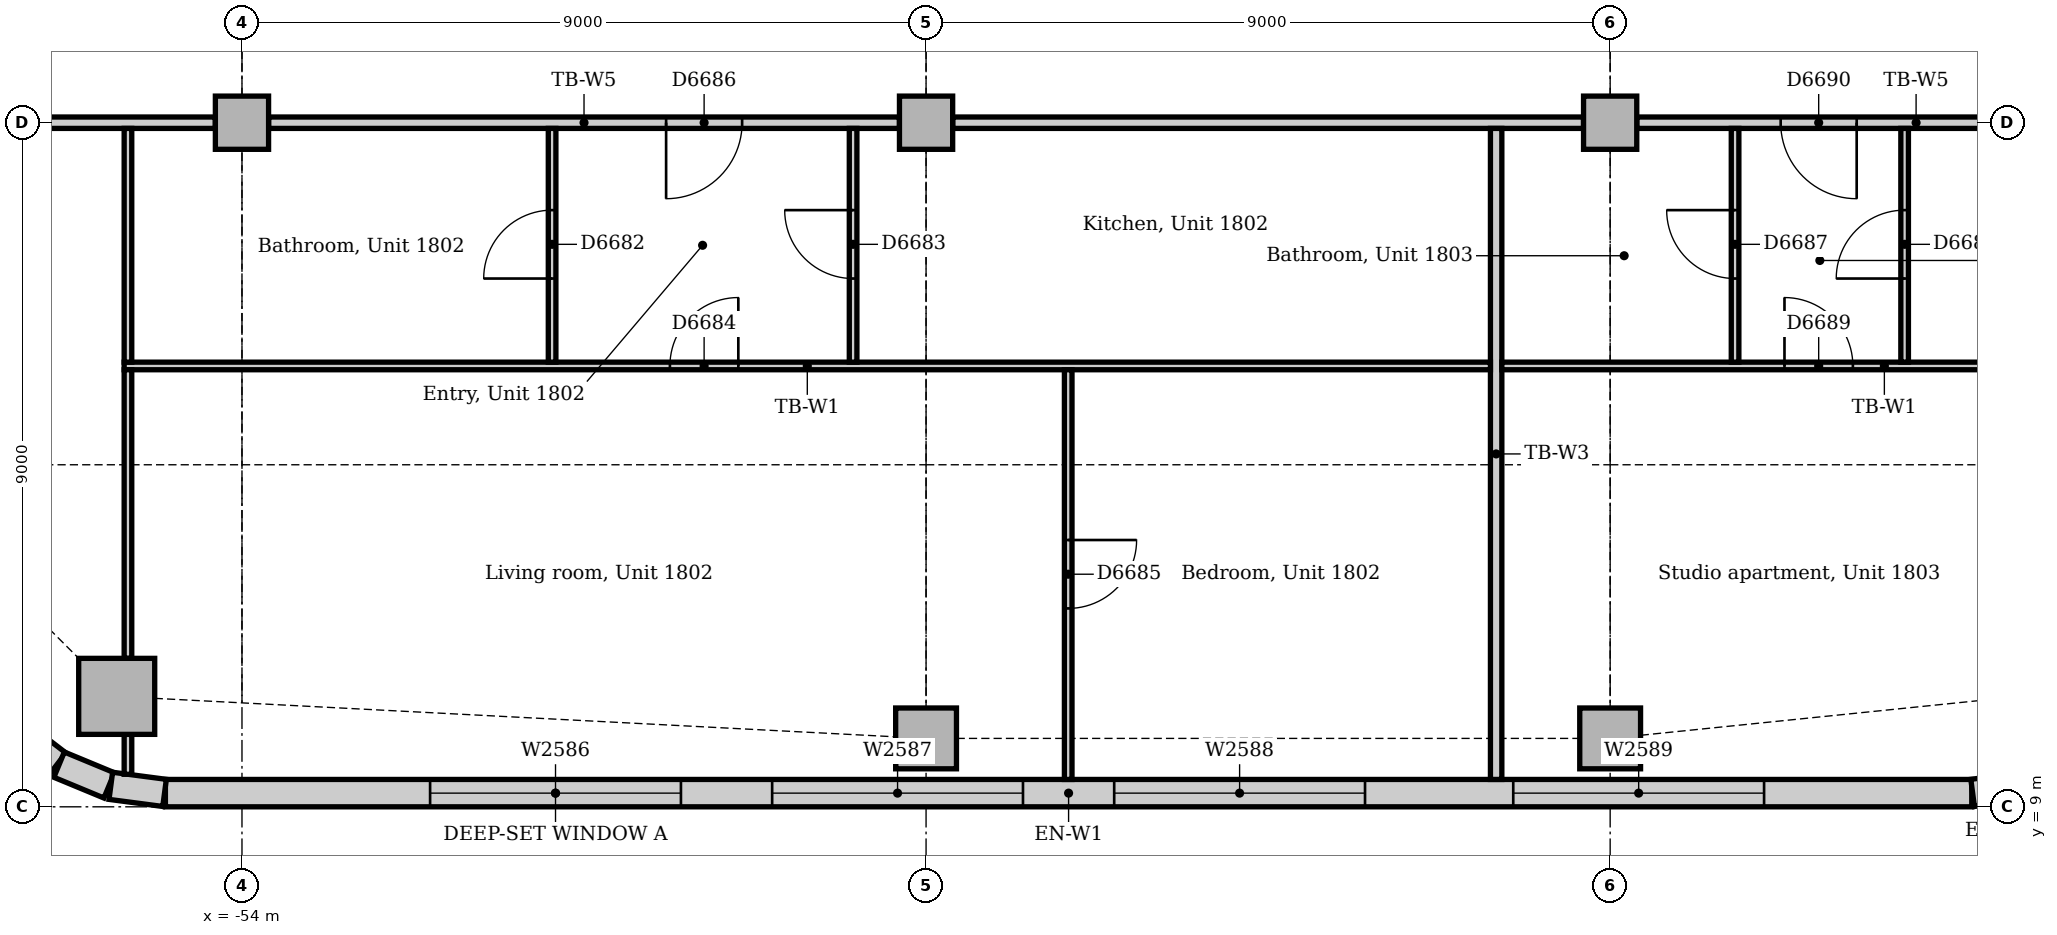
"""IFC4 building model, lengths in metres.
Left out: names, types, materials, properties, quantities, classifications, styles, units other than length and angle.
Written with IfcOpenShell. Run it as: python <this file> out.ifc"""

import sys

from ifc_helpers import new_model, si_unit, direction, frame, frame_2d, origin, origin_2d, place, context, subcontext, project, spatial, rectangle, extrude, element, fill, save


model = new_model("IFC4")
c1 = context("Model", 3, precision=1e-05, world=origin(), true_north=direction((0.0, 1.0)))
c2 = subcontext(c1, "Body", "Model", "MODEL_VIEW")
j1 = project(units=[si_unit("LENGTHUNIT", "METRE"), si_unit("PLANEANGLEUNIT", "RADIAN")], contexts=[c1])
p1 = place(None, origin())
s1 = spatial("IfcSite", under=j1, at=p1, CompositionType="ELEMENT")
p2 = place(p1, origin())
s2 = spatial("IfcBuilding", under=s1, at=p2, CompositionType="ELEMENT")
p3 = place(p2, frame((0.0, 0.0, 79.0)))
s3 = spatial("IfcBuildingStorey", under=s2, at=p3, CompositionType="ELEMENT", Elevation=79.0)
p4 = place(p3, frame((-55.648, 10.453, 0.0), z_axis=(0.0, 0.0, 1.0), x_axis=(1.0, 0.0, 0.0)))
e1 = element("IfcColumn", 1, at=p4, inside=s3, PredefinedType="COLUMN", context=c2, shape_type="SweptSolid", body=[
    extrude(rectangle(XDim=1.0, YDim=1.0, at=origin_2d()), origin(), (0.0, 0.0, 1.0), 3.85),
])
for number, where, z_axis, x_axis in (
    (2, (-45.0, 9.9, 0.0), (0.0, 0.0, 1.0), (1.0, 0.0, 0.0)),
    (3, (-36.0, 9.9, 0.0), (0.0, 0.0, 1.0), (1.0, 0.0, 0.0)),
):
    element("IfcColumn", number, at=place(p3, frame(where, z_axis=z_axis, x_axis=x_axis)), inside=s3, PredefinedType="COLUMN", context=c2, shape_type="SweptSolid", body=[
        extrude(rectangle(XDim=0.8, YDim=0.8, at=origin_2d()), origin(), (0.0, 0.0, 1.0), 3.85),
    ])
for number, where, z_axis, x_axis in (
    (4, (-54.0, 18.0, 0.0), (0.0, 0.0, 1.0), (1.0, 0.0, 0.0)),
    (5, (-45.0, 18.0, 0.0), (0.0, 0.0, 1.0), (1.0, 0.0, 0.0)),
    (6, (-36.0, 18.0, 0.0), (0.0, 0.0, 1.0), (1.0, 0.0, 0.0)),
):
    element("IfcColumn", number, at=place(p3, frame(where, z_axis=z_axis, x_axis=x_axis)), inside=s3, PredefinedType="COLUMN", context=c2, shape_type="SweptSolid", body=[
        extrude(rectangle(XDim=0.7, YDim=0.7, at=origin_2d()), origin(), (0.0, 0.0, 1.0), 3.85),
    ])
p5 = place(p3, frame((-55.007, 9.18, 0.0), z_axis=(0.0, 0.0, 1.0), x_axis=(1.0, 0.0, 0.0)))
e7 = element("IfcWall", 7, at=p5, inside=s3, PredefinedType="STANDARD", context=c2, shape_type="SweptSolid", body=[
    extrude(rectangle(XDim=23.765, YDim=0.36, at=frame_2d((11.882, 0.0))), origin(), (0.0, 0.0, 1.0), 3.85),
])
p6 = place(p5, frame((3.482, 0.0, 0.9)))
e8 = element("IfcOpeningElement", 8, at=p6, cuts=e7, PredefinedType="OPENING", context=c2, shape_type="SweptSolid", body=[
    extrude(rectangle(XDim=3.3, YDim=1.6, at=frame_2d((1.65, 0.8))), frame((0.0, 0.19, 0.0), z_axis=(0.0, -1.0, 0.0), x_axis=(1.0, 0.0, 0.0)), (0.0, 0.0, 1.0), 0.38),
])
p7 = place(p5, frame((7.982, 0.0, 0.9)))
e9 = element("IfcOpeningElement", 9, at=p7, cuts=e7, PredefinedType="OPENING", context=c2, shape_type="SweptSolid", body=[
    extrude(rectangle(XDim=3.3, YDim=1.6, at=frame_2d((1.65, 0.8))), frame((0.0, 0.19, 0.0), z_axis=(0.0, -1.0, 0.0), x_axis=(1.0, 0.0, 0.0)), (0.0, 0.0, 1.0), 0.38),
])
p8 = place(p5, frame((12.482, 0.0, 0.9)))
e10 = element("IfcOpeningElement", 10, at=p8, cuts=e7, PredefinedType="OPENING", context=c2, shape_type="SweptSolid", body=[
    extrude(rectangle(XDim=3.3, YDim=1.6, at=frame_2d((1.65, 0.8))), frame((0.0, 0.19, 0.0), z_axis=(0.0, -1.0, 0.0), x_axis=(1.0, 0.0, 0.0)), (0.0, 0.0, 1.0), 0.38),
])
p9 = place(p5, frame((17.732, 0.0, 0.9)))
e11 = element("IfcOpeningElement", 11, at=p9, cuts=e7, PredefinedType="OPENING", context=c2, shape_type="SweptSolid", body=[
    extrude(rectangle(XDim=3.3, YDim=1.6, at=frame_2d((1.65, 0.8))), frame((0.0, 0.19, 0.0), z_axis=(0.0, -1.0, 0.0), x_axis=(1.0, 0.0, 0.0)), (0.0, 0.0, 1.0), 0.38),
])
p10 = place(p3, frame((-31.231, 9.183, 0.0), z_axis=(0.0, 0.0, 1.0), x_axis=(0.99144092581, 0.13055608231, 0.0)))
e12 = element("IfcWall", 12, at=p10, inside=s3, PredefinedType="STANDARD", context=c2, shape_type="SweptSolid", body=[
    extrude(rectangle(XDim=0.713, YDim=0.36, at=frame_2d((0.356, 0.0))), origin(), (0.0, 0.0, 1.0), 3.85),
])
p11 = place(p3, frame((-56.991, 10.0, 0.0), z_axis=(0.0, 0.0, 1.0), x_axis=(0.793321924995, -0.608802368033, 0.0)))
e13 = element("IfcWall", 13, at=p11, inside=s3, PredefinedType="STANDARD", context=c2, shape_type="SweptSolid", body=[
    extrude(rectangle(XDim=0.713, YDim=0.36, at=frame_2d((0.357, 0.0))), origin(), (0.0, 0.0, 1.0), 3.85),
])
for number, where, z_axis, x_axis in (
    (14, (-56.406, 9.555, 0.0), (0.0, 0.0, 1.0), (0.924, -0.383, 0.0)),
    (15, (-55.726, 9.276, 0.0), (0.0, 0.0, 1.0), (0.991, -0.131, 0.0)),
):
    element("IfcWall", number, at=place(p3, frame(where, z_axis=z_axis, x_axis=x_axis)), inside=s3, PredefinedType="STANDARD", context=c2, shape_type="SweptSolid", body=[
        extrude(rectangle(XDim=0.713, YDim=0.36, at=frame_2d((0.356, 0.0))), origin(), (0.0, 0.0, 1.0), 3.85),
    ])
p12 = place(p3, frame((-35.65, 18.0, 0.0), z_axis=(0.0, 0.0, 1.0), x_axis=(1.0, 0.0, 0.0)))
e16 = element("IfcWall", 16, at=p12, inside=s3, PredefinedType="PARTITIONING", context=c2, shape_type="SweptSolid", body=[
    extrude(rectangle(XDim=7.35, YDim=0.15, at=frame_2d((3.675, 0.0))), origin(), (0.0, 0.0, 1.0), 3.158),
])
p13 = place(p12, frame((1.893, 0.0, 0.0)))
e17 = element("IfcOpeningElement", 17, at=p13, cuts=e16, PredefinedType="OPENING", context=c2, shape_type="SweptSolid", body=[
    extrude(rectangle(XDim=1.0, YDim=2.1, at=frame_2d((0.5, 1.05))), frame((0.0, 0.085, 0.0), z_axis=(0.0, -1.0, 0.0), x_axis=(1.0, 0.0, 0.0)), (0.0, 0.0, 1.0), 0.17),
])
p14 = place(p3, frame((-44.65, 18.0, 0.0), z_axis=(0.0, 0.0, 1.0), x_axis=(1.0, 0.0, 0.0)))
e18 = element("IfcWall", 18, at=p14, inside=s3, PredefinedType="PARTITIONING", context=c2, shape_type="SweptSolid", body=[
    extrude(rectangle(XDim=8.3, YDim=0.15, at=frame_2d((4.15, 0.0))), origin(), (0.0, 0.0, 1.0), 3.158),
])
p15 = place(p3, frame((-53.65, 18.0, 0.0), z_axis=(0.0, 0.0, 1.0), x_axis=(1.0, 0.0, 0.0)))
e19 = element("IfcWall", 19, at=p15, inside=s3, PredefinedType="PARTITIONING", context=c2, shape_type="SweptSolid", body=[
    extrude(rectangle(XDim=8.3, YDim=0.15, at=frame_2d((4.15, 0.0))), origin(), (0.0, 0.0, 1.0), 3.158),
])
p16 = place(p15, frame((5.23, 0.0, 0.0)))
e20 = element("IfcOpeningElement", 20, at=p16, cuts=e19, PredefinedType="OPENING", context=c2, shape_type="SweptSolid", body=[
    extrude(rectangle(XDim=1.0, YDim=2.1, at=frame_2d((0.5, 1.05))), frame((0.0, 0.085, 0.0), z_axis=(0.0, -1.0, 0.0), x_axis=(1.0, 0.0, 0.0)), (0.0, 0.0, 1.0), 0.17),
])
p17 = place(p3, frame((-64.596, 18.0, 0.0), z_axis=(0.0, 0.0, 1.0), x_axis=(1.0, 0.0, 0.0)))
e21 = element("IfcWall", 21, at=p17, inside=s3, PredefinedType="PARTITIONING", context=c2, shape_type="SweptSolid", body=[
    extrude(rectangle(XDim=10.246, YDim=0.15, at=frame_2d((5.123, 0.0))), origin(), (0.0, 0.0, 1.0), 3.158),
])
p18 = place(p17, frame((4.15, 0.0, 0.0)))
e22 = element("IfcOpeningElement", 22, at=p18, cuts=e21, PredefinedType="OPENING", context=c2, shape_type="SweptSolid", body=[
    extrude(rectangle(XDim=0.9, YDim=2.1, at=frame_2d((0.45, 1.05))), frame((0.0, 0.085, 0.0), z_axis=(0.0, -1.0, 0.0), x_axis=(1.0, 0.0, 0.0)), (0.0, 0.0, 1.0), 0.17),
])
p19 = place(p3, frame((-37.5, 9.36, 0.0), z_axis=(0.0, 0.0, 1.0), x_axis=(0.0, 1.0, 0.0)))
e23 = element("IfcWall", 23, at=p19, inside=s3, PredefinedType="PARTITIONING", context=c2, shape_type="SweptSolid", body=[
    extrude(rectangle(XDim=8.565, YDim=0.15, at=frame_2d((4.282, 0.0))), origin(), (0.0, 0.0, 1.0), 3.85),
])
p20 = place(p3, frame((-55.55, 14.8, 0.0), z_axis=(0.0, 0.0, 1.0), x_axis=(1.0, 0.0, 0.0)))
e24 = element("IfcWall", 24, at=p20, inside=s3, PredefinedType="PARTITIONING", context=c2, shape_type="SweptSolid", body=[
    extrude(rectangle(XDim=17.975, YDim=0.1, at=frame_2d((8.988, 0.0))), origin(), (0.0, 0.0, 1.0), 3.85),
])
p21 = place(p20, frame((7.18, 0.0, 0.0)))
e25 = element("IfcOpeningElement", 25, at=p21, cuts=e24, PredefinedType="OPENING", context=c2, shape_type="SweptSolid", body=[
    extrude(rectangle(XDim=0.9, YDim=2.1, at=frame_2d((0.45, 1.05))), frame((0.0, 0.06, 0.0), z_axis=(0.0, -1.0, 0.0), x_axis=(1.0, 0.0, 0.0)), (0.0, 0.0, 1.0), 0.12),
])
p22 = place(p3, frame((-37.425, 14.8, 0.0), z_axis=(0.0, 0.0, 1.0), x_axis=(1.0, 0.0, 0.0)))
e26 = element("IfcWall", 26, at=p22, inside=s3, PredefinedType="PARTITIONING", context=c2, shape_type="SweptSolid", body=[
    extrude(rectangle(XDim=10.065, YDim=0.1, at=frame_2d((5.032, 0.0))), origin(), (0.0, 0.0, 1.0), 3.85),
])
p23 = place(p22, frame((3.718, 0.0, 0.0)))
e27 = element("IfcOpeningElement", 27, at=p23, cuts=e26, PredefinedType="OPENING", context=c2, shape_type="SweptSolid", body=[
    extrude(rectangle(XDim=0.9, YDim=2.1, at=frame_2d((0.45, 1.05))), frame((0.0, 0.06, 0.0), z_axis=(0.0, -1.0, 0.0), x_axis=(1.0, 0.0, 0.0)), (0.0, 0.0, 1.0), 0.12),
])
p24 = place(p3, frame((-55.5, 14.85, 0.0), z_axis=(0.0, 0.0, 1.0), x_axis=(0.0, 1.0, 0.0)))
e28 = element("IfcWall", 28, at=p24, inside=s3, PredefinedType="PARTITIONING", context=c2, shape_type="SweptSolid", body=[
    extrude(rectangle(XDim=3.075, YDim=0.1, at=frame_2d((1.538, 0.0))), origin(), (0.0, 0.0, 1.0), 3.85),
])
p25 = place(p3, frame((-55.5, 10.953, 0.0), z_axis=(0.0, 0.0, 1.0), x_axis=(0.0, 1.0, 0.0)))
e29 = element("IfcWall", 29, at=p25, inside=s3, PredefinedType="PARTITIONING", context=c2, shape_type="SweptSolid", body=[
    extrude(rectangle(XDim=3.797, YDim=0.1, at=frame_2d((1.898, 0.0))), origin(), (0.0, 0.0, 1.0), 3.85),
])
p26 = place(p3, frame((-55.5, 9.428, 0.0), z_axis=(0.0, 0.0, 1.0), x_axis=(0.0, 1.0, 0.0)))
e30 = element("IfcWall", 30, at=p26, inside=s3, PredefinedType="PARTITIONING", context=c2, shape_type="SweptSolid", body=[
    extrude(rectangle(XDim=0.525, YDim=0.1, at=frame_2d((0.263, 0.0))), origin(), (0.0, 0.0, 1.0), 3.85),
])
p27 = place(p3, frame((-43.13, 9.36, 0.0), z_axis=(0.0, 0.0, 1.0), x_axis=(0.0, 1.0, 0.0)))
e31 = element("IfcWall", 31, at=p27, inside=s3, PredefinedType="PARTITIONING", context=c2, shape_type="SweptSolid", body=[
    extrude(rectangle(XDim=5.39, YDim=0.1, at=frame_2d((2.695, 0.0))), origin(), (0.0, 0.0, 1.0), 3.85),
])
p28 = place(p27, frame((2.25, 0.0, 0.0)))
e32 = element("IfcOpeningElement", 32, at=p28, cuts=e31, PredefinedType="OPENING", context=c2, shape_type="SweptSolid", body=[
    extrude(rectangle(XDim=0.9, YDim=2.1, at=frame_2d((0.45, 1.05))), frame((0.0, 0.06, 0.0), z_axis=(0.0, -1.0, 0.0), x_axis=(1.0, 0.0, 0.0)), (0.0, 0.0, 1.0), 0.12),
])
p29 = place(p3, frame((-49.92, 14.85, 0.0), z_axis=(0.0, 0.0, 1.0), x_axis=(0.0, 1.0, 0.0)))
e33 = element("IfcWall", 33, at=p29, inside=s3, PredefinedType="PARTITIONING", context=c2, shape_type="SweptSolid", body=[
    extrude(rectangle(XDim=3.075, YDim=0.1, at=frame_2d((1.538, 0.0))), origin(), (0.0, 0.0, 1.0), 3.85),
])
p30 = place(p29, frame((1.1, 0.0, 0.0)))
e34 = element("IfcOpeningElement", 34, at=p30, cuts=e33, PredefinedType="OPENING", context=c2, shape_type="SweptSolid", body=[
    extrude(rectangle(XDim=0.9, YDim=2.1, at=frame_2d((0.45, 1.05))), frame((0.0, 0.06, 0.0), z_axis=(0.0, -1.0, 0.0), x_axis=(1.0, 0.0, 0.0)), (0.0, 0.0, 1.0), 0.12),
])
p31 = place(p3, frame((-45.96, 14.85, 0.0), z_axis=(0.0, 0.0, 1.0), x_axis=(0.0, 1.0, 0.0)))
e35 = element("IfcWall", 35, at=p31, inside=s3, PredefinedType="PARTITIONING", context=c2, shape_type="SweptSolid", body=[
    extrude(rectangle(XDim=3.075, YDim=0.1, at=frame_2d((1.538, 0.0))), origin(), (0.0, 0.0, 1.0), 3.85),
])
p32 = place(p31, frame((1.1, 0.0, 0.0)))
e36 = element("IfcOpeningElement", 36, at=p32, cuts=e35, PredefinedType="OPENING", context=c2, shape_type="SweptSolid", body=[
    extrude(rectangle(XDim=0.9, YDim=2.1, at=frame_2d((0.45, 1.05))), frame((0.0, 0.06, 0.0), z_axis=(0.0, -1.0, 0.0), x_axis=(1.0, 0.0, 0.0)), (0.0, 0.0, 1.0), 0.12),
])
p33 = place(p3, frame((-34.357, 14.85, 0.0), z_axis=(0.0, 0.0, 1.0), x_axis=(0.0, 1.0, 0.0)))
e37 = element("IfcWall", 37, at=p33, inside=s3, PredefinedType="PARTITIONING", context=c2, shape_type="SweptSolid", body=[
    extrude(rectangle(XDim=3.075, YDim=0.1, at=frame_2d((1.538, 0.0))), origin(), (0.0, 0.0, 1.0), 3.85),
])
p34 = place(p33, frame((1.1, 0.0, 0.0)))
e38 = element("IfcOpeningElement", 38, at=p34, cuts=e37, PredefinedType="OPENING", context=c2, shape_type="SweptSolid", body=[
    extrude(rectangle(XDim=0.9, YDim=2.1, at=frame_2d((0.45, 1.05))), frame((0.0, 0.06, 0.0), z_axis=(0.0, -1.0, 0.0), x_axis=(1.0, 0.0, 0.0)), (0.0, 0.0, 1.0), 0.12),
])
p35 = place(p3, frame((-32.126, 14.85, 0.0), z_axis=(0.0, 0.0, 1.0), x_axis=(0.0, 1.0, 0.0)))
e39 = element("IfcWall", 39, at=p35, inside=s3, PredefinedType="PARTITIONING", context=c2, shape_type="SweptSolid", body=[
    extrude(rectangle(XDim=3.075, YDim=0.1, at=frame_2d((1.538, 0.0))), origin(), (0.0, 0.0, 1.0), 3.85),
])
p36 = place(p35, frame((1.1, 0.0, 0.0)))
e40 = element("IfcOpeningElement", 40, at=p36, cuts=e39, PredefinedType="OPENING", context=c2, shape_type="SweptSolid", body=[
    extrude(rectangle(XDim=0.9, YDim=2.1, at=frame_2d((0.45, 1.05))), frame((0.0, 0.06, 0.0), z_axis=(0.0, -1.0, 0.0), x_axis=(1.0, 0.0, 0.0)), (0.0, 0.0, 1.0), 0.12),
])
p37 = place(p6, origin())
e41 = element("IfcWindow", 41, at=p37, inside=s3, PartitioningType="SINGLE_PANEL", PredefinedType="WINDOW", context=c2, shape_type="SweptSolid", body=[
    extrude(rectangle(XDim=3.3, YDim=1.6, at=frame_2d((1.65, 0.8))), frame((0.0, 0.13, 0.0), z_axis=(0.0, -1.0, 0.0), x_axis=(1.0, 0.0, 0.0)), (0.0, 0.0, 1.0), 0.06),
])
fill(e8, e41)
p38 = place(p7, origin())
e42 = element("IfcWindow", 42, at=p38, inside=s3, PartitioningType="SINGLE_PANEL", PredefinedType="WINDOW", context=c2, shape_type="SweptSolid", body=[
    extrude(rectangle(XDim=3.3, YDim=1.6, at=frame_2d((1.65, 0.8))), frame((0.0, 0.13, 0.0), z_axis=(0.0, -1.0, 0.0), x_axis=(1.0, 0.0, 0.0)), (0.0, 0.0, 1.0), 0.06),
])
fill(e9, e42)
p39 = place(p8, origin())
e43 = element("IfcWindow", 43, at=p39, inside=s3, PartitioningType="SINGLE_PANEL", PredefinedType="WINDOW", context=c2, shape_type="SweptSolid", body=[
    extrude(rectangle(XDim=3.3, YDim=1.6, at=frame_2d((1.65, 0.8))), frame((0.0, 0.13, 0.0), z_axis=(0.0, -1.0, 0.0), x_axis=(1.0, 0.0, 0.0)), (0.0, 0.0, 1.0), 0.06),
])
fill(e10, e43)
p40 = place(p9, origin())
e44 = element("IfcWindow", 44, at=p40, inside=s3, PartitioningType="SINGLE_PANEL", PredefinedType="WINDOW", context=c2, shape_type="SweptSolid", body=[
    extrude(rectangle(XDim=3.3, YDim=1.6, at=frame_2d((1.65, 0.8))), frame((0.0, 0.13, 0.0), z_axis=(0.0, -1.0, 0.0), x_axis=(1.0, 0.0, 0.0)), (0.0, 0.0, 1.0), 0.06),
])
fill(e11, e44)
p41 = place(p30, origin())
e45 = element("IfcDoor", 45, at=p41, inside=s3, OperationType="SINGLE_SWING_LEFT", PredefinedType="DOOR", context=c2, shape_type="SweptSolid", body=[
    extrude(rectangle(XDim=0.9, YDim=2.1, at=frame_2d((0.45, 1.05))), frame((0.0, 0.025, 0.0), z_axis=(0.0, -1.0, 0.0), x_axis=(1.0, 0.0, 0.0)), (0.0, 0.0, 1.0), 0.05),
])
fill(e34, e45)
p42 = place(p32, origin())
e46 = element("IfcDoor", 46, at=p42, inside=s3, OperationType="SINGLE_SWING_RIGHT", PredefinedType="DOOR", context=c2, shape_type="SweptSolid", body=[
    extrude(rectangle(XDim=0.9, YDim=2.1, at=frame_2d((0.45, 1.05))), frame((0.0, 0.025, 0.0), z_axis=(0.0, -1.0, 0.0), x_axis=(1.0, 0.0, 0.0)), (0.0, 0.0, 1.0), 0.05),
])
fill(e36, e46)
p43 = place(p21, origin())
e47 = element("IfcDoor", 47, at=p43, inside=s3, OperationType="SINGLE_SWING_RIGHT", PredefinedType="DOOR", context=c2, shape_type="SweptSolid", body=[
    extrude(rectangle(XDim=0.9, YDim=2.1, at=frame_2d((0.45, 1.05))), frame((0.0, 0.025, 0.0), z_axis=(0.0, -1.0, 0.0), x_axis=(1.0, 0.0, 0.0)), (0.0, 0.0, 1.0), 0.05),
])
fill(e25, e47)
p44 = place(p28, frame((0.9, 0.0, 0.0), z_axis=(0.0, 0.0, 1.0), x_axis=(-1.0, 0.0, 0.0)))
e48 = element("IfcDoor", 48, at=p44, inside=s3, OperationType="SINGLE_SWING_LEFT", PredefinedType="DOOR", context=c2, shape_type="SweptSolid", body=[
    extrude(rectangle(XDim=0.9, YDim=2.1, at=frame_2d((0.45, 1.05))), frame((0.0, 0.025, 0.0), z_axis=(0.0, -1.0, 0.0), x_axis=(1.0, 0.0, 0.0)), (0.0, 0.0, 1.0), 0.05),
])
fill(e32, e48)
p45 = place(p16, frame((1.0, 0.0, 0.0), z_axis=(0.0, 0.0, 1.0), x_axis=(-1.0, 0.0, 0.0)))
e49 = element("IfcDoor", 49, at=p45, inside=s3, OperationType="SINGLE_SWING_RIGHT", PredefinedType="DOOR", context=c2, shape_type="SweptSolid", body=[
    extrude(rectangle(XDim=1.0, YDim=2.1, at=frame_2d((0.5, 1.05))), frame((0.0, 0.025, 0.0), z_axis=(0.0, -1.0, 0.0), x_axis=(1.0, 0.0, 0.0)), (0.0, 0.0, 1.0), 0.05),
])
fill(e20, e49)
p46 = place(p34, origin())
e50 = element("IfcDoor", 50, at=p46, inside=s3, OperationType="SINGLE_SWING_RIGHT", PredefinedType="DOOR", context=c2, shape_type="SweptSolid", body=[
    extrude(rectangle(XDim=0.9, YDim=2.1, at=frame_2d((0.45, 1.05))), frame((0.0, 0.025, 0.0), z_axis=(0.0, -1.0, 0.0), x_axis=(1.0, 0.0, 0.0)), (0.0, 0.0, 1.0), 0.05),
])
fill(e38, e50)
p47 = place(p36, origin())
e51 = element("IfcDoor", 51, at=p47, inside=s3, OperationType="SINGLE_SWING_LEFT", PredefinedType="DOOR", context=c2, shape_type="SweptSolid", body=[
    extrude(rectangle(XDim=0.9, YDim=2.1, at=frame_2d((0.45, 1.05))), frame((0.0, 0.025, 0.0), z_axis=(0.0, -1.0, 0.0), x_axis=(1.0, 0.0, 0.0)), (0.0, 0.0, 1.0), 0.05),
])
fill(e40, e51)
p48 = place(p23, origin())
e52 = element("IfcDoor", 52, at=p48, inside=s3, OperationType="SINGLE_SWING_LEFT", PredefinedType="DOOR", context=c2, shape_type="SweptSolid", body=[
    extrude(rectangle(XDim=0.9, YDim=2.1, at=frame_2d((0.45, 1.05))), frame((0.0, 0.025, 0.0), z_axis=(0.0, -1.0, 0.0), x_axis=(1.0, 0.0, 0.0)), (0.0, 0.0, 1.0), 0.05),
])
fill(e27, e52)
p49 = place(p13, frame((1.0, 0.0, 0.0), z_axis=(0.0, 0.0, 1.0), x_axis=(-1.0, 0.0, 0.0)))
e53 = element("IfcDoor", 53, at=p49, inside=s3, OperationType="SINGLE_SWING_LEFT", PredefinedType="DOOR", context=c2, shape_type="SweptSolid", body=[
    extrude(rectangle(XDim=1.0, YDim=2.1, at=frame_2d((0.5, 1.05))), frame((0.0, 0.025, 0.0), z_axis=(0.0, -1.0, 0.0), x_axis=(1.0, 0.0, 0.0)), (0.0, 0.0, 1.0), 0.05),
])
fill(e17, e53)
save(model, sys.argv[1])
